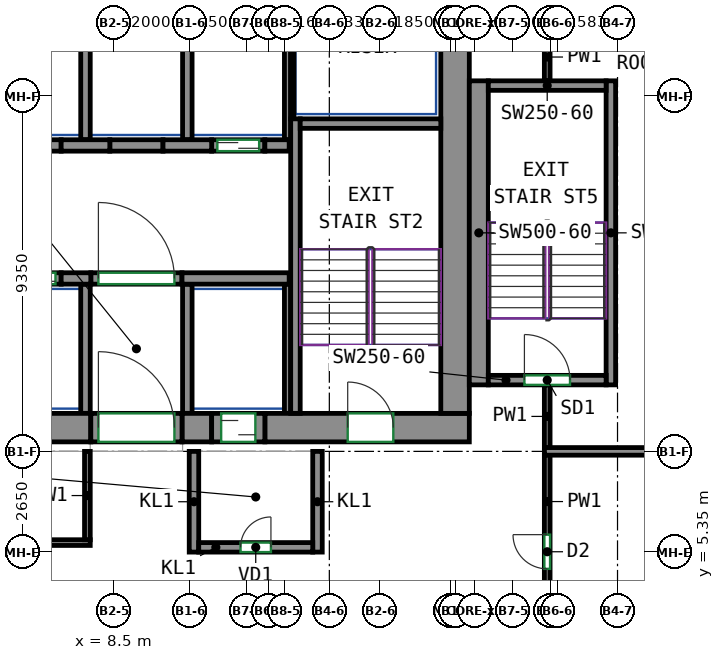
"""IFC4 building model, lengths in metres.
Left out: names, types, materials, properties, quantities, classifications, styles, units other than length and angle.
Written with IfcOpenShell. Run it as: python <this file> out.ifc"""

import sys

from ifc_helpers import new_model, si_unit, direction, frame, frame_2d, origin, place, context, subcontext, project, spatial, rectangle, extrude, source, transform, mapped, element, fill, save


model = new_model("IFC4")
c1 = context("Model", 3, precision=1e-05, world=origin(), true_north=direction((0.0, 1.0)))
c2 = subcontext(c1, "Body", "Model", "MODEL_VIEW")
j1 = project(units=[si_unit("LENGTHUNIT", "METRE"), si_unit("PLANEANGLEUNIT", "RADIAN")], contexts=[c1])
p1 = place(None, origin())
s1 = spatial("IfcSite", under=j1, at=p1, CompositionType="ELEMENT")
p2 = place(p1, origin())
s2 = spatial("IfcBuilding", under=s1, at=p2, CompositionType="ELEMENT")
p3 = place(p2, frame((0.0, 0.0, 188.9)))
s3 = spatial("IfcBuildingStorey", under=s2, at=p3, CompositionType="ELEMENT", Elevation=188.9)
m1 = source(origin(), c2, "Body", "SweptSolid", [
    extrude(rectangle(XDim=14.18, YDim=0.75, at=frame_2d((7.09, 0.0))), origin(), (0.0, 0.0, 1.0), 3.12),
])
p4 = place(p3, frame((-6.29, 8.625, 0.0), z_axis=(0.0, 0.0, 1.0), x_axis=(1.0, 0.0, 0.0)))
e1 = element("IfcWall", 1, at=p4, inside=s3, PredefinedType="SHEAR", context=c2, shape_type="MappedRepresentation", body=[
    mapped(m1, transform((0.0, 0.0, 0.0))),
])
m2 = source(origin(), c2, "Body", "SweptSolid", [
    extrude(rectangle(XDim=0.78, YDim=0.75, at=frame_2d((0.39, 0.0))), origin(), (0.0, 0.0, 1.0), 3.12),
])
p5 = place(p3, frame((10.29, 8.625, 0.0), z_axis=(0.0, 0.0, 1.0), x_axis=(1.0, 0.0, 0.0)))
e2 = element("IfcWall", 2, at=p5, inside=s3, PredefinedType="SHEAR", context=c2, shape_type="MappedRepresentation", body=[
    mapped(m2, transform((0.0, 0.0, 0.0))),
])
m3 = source(origin(), c2, "Body", "SweptSolid", [
    extrude(rectangle(XDim=5.38, YDim=0.75, at=frame_2d((2.69, 0.0))), origin(), (0.0, 0.0, 1.0), 3.12),
])
p6 = place(p3, frame((12.47, 8.625, 0.0), z_axis=(0.0, 0.0, 1.0), x_axis=(1.0, 0.0, 0.0)))
e3 = element("IfcWall", 3, at=p6, inside=s3, PredefinedType="SHEAR", context=c2, shape_type="MappedRepresentation", body=[
    mapped(m3, transform((0.0, 0.0, 0.0))),
])
p7 = place(p6, frame((2.18, 0.0, 0.0)))
e4 = element("IfcOpeningElement", 4, at=p7, cuts=e3, PredefinedType="OPENING", context=c2, shape_type="SweptSolid", body=[
    extrude(rectangle(XDim=1.2, YDim=2.1, at=frame_2d((0.6, 1.05))), frame((0.0, 0.385, 0.0), z_axis=(0.0, -1.0, 0.0), x_axis=(1.0, 0.0, 0.0)), (0.0, 0.0, 1.0), 0.77),
])
m4 = source(origin(), c2, "Body", "SweptSolid", [
    extrude(rectangle(XDim=12.0, YDim=0.75, at=frame_2d((6.0, 0.0))), origin(), (0.0, 0.0, 1.0), 3.12),
])
p8 = place(p3, frame((17.475, 9.0, 0.0), z_axis=(0.0, 0.0, 1.0), x_axis=(0.0, 1.0, 0.0)))
e5 = element("IfcWall", 5, at=p8, inside=s3, PredefinedType="SHEAR", context=c2, shape_type="MappedRepresentation", body=[
    mapped(m4, transform((0.0, 0.0, 0.0))),
])
m5 = source(origin(), c2, "Body", "SweptSolid", [
    extrude(rectangle(XDim=7.75, YDim=0.25, at=frame_2d((3.875, 0.0))), origin(), (0.0, 0.0, 1.0), 3.12),
])
p9 = place(p3, frame((13.275, 9.0, 0.0), z_axis=(0.0, 0.0, 1.0), x_axis=(0.0, 1.0, 0.0)))
e6 = element("IfcWall", 6, at=p9, inside=s3, PredefinedType="SHEAR", context=c2, shape_type="MappedRepresentation", body=[
    mapped(m5, transform((0.0, 0.0, 0.0))),
])
m6 = source(origin(), c2, "Body", "SweptSolid", [
    extrude(rectangle(XDim=3.7, YDim=0.25, at=frame_2d((1.85, 0.0))), origin(), (0.0, 0.0, 1.0), 3.12),
])
p10 = place(p3, frame((13.4, 16.625, 0.0), z_axis=(0.0, 0.0, 1.0), x_axis=(1.0, 0.0, 0.0)))
e7 = element("IfcWall", 7, at=p10, inside=s3, PredefinedType="SHEAR", context=c2, shape_type="MappedRepresentation", body=[
    mapped(m6, transform((0.0, 0.0, 0.0))),
])
m7 = source(origin(), c2, "Body", "SweptSolid", [
    extrude(rectangle(XDim=8.0, YDim=0.5, at=frame_2d((4.0, 0.0))), origin(), (0.0, 0.0, 1.0), 3.12),
])
p11 = place(p3, frame((18.1, 9.75, 0.0), z_axis=(0.0, 0.0, 1.0), x_axis=(0.0, 1.0, 0.0)))
e8 = element("IfcWall", 8, at=p11, inside=s3, PredefinedType="SHEAR", context=c2, shape_type="MappedRepresentation", body=[
    mapped(m7, transform((0.0, 0.0, 0.0))),
])
m8 = source(origin(), c2, "Body", "SweptSolid", [
    extrude(rectangle(XDim=8.0, YDim=0.25, at=frame_2d((4.0, 0.0))), origin(), (0.0, 0.0, 1.0), 3.12),
])
p12 = place(p3, frame((21.575, 9.75, 0.0), z_axis=(0.0, 0.0, 1.0), x_axis=(0.0, 1.0, 0.0)))
e9 = element("IfcWall", 9, at=p12, inside=s3, PredefinedType="SHEAR", context=c2, shape_type="MappedRepresentation", body=[
    mapped(m8, transform((0.0, 0.0, 0.0))),
])
m9 = source(origin(), c2, "Body", "SweptSolid", [
    extrude(rectangle(XDim=3.1, YDim=0.25, at=frame_2d((1.55, 0.0))), origin(), (0.0, 0.0, 1.0), 3.12),
])
p13 = place(p3, frame((18.35, 9.875, 0.0), z_axis=(0.0, 0.0, 1.0), x_axis=(1.0, 0.0, 0.0)))
e10 = element("IfcWall", 10, at=p13, inside=s3, PredefinedType="SHEAR", context=c2, shape_type="MappedRepresentation", body=[
    mapped(m9, transform((0.0, 0.0, 0.0))),
])
p14 = place(p13, frame((0.95, 0.0, 0.0)))
e11 = element("IfcOpeningElement", 11, at=p14, cuts=e10, PredefinedType="OPENING", context=c2, shape_type="SweptSolid", body=[
    extrude(rectangle(XDim=1.2, YDim=2.1, at=frame_2d((0.6, 1.05))), frame((0.0, 0.135, 0.0), z_axis=(0.0, -1.0, 0.0), x_axis=(1.0, 0.0, 0.0)), (0.0, 0.0, 1.0), 0.27),
])
p15 = place(p3, frame((18.35, 17.625, 0.0), z_axis=(0.0, 0.0, 1.0), x_axis=(1.0, 0.0, 0.0)))
e12 = element("IfcWall", 12, at=p15, inside=s3, PredefinedType="SHEAR", context=c2, shape_type="MappedRepresentation", body=[
    mapped(m9, transform((0.0, 0.0, 0.0))),
])
m10 = source(origin(), c2, "Body", "SweptSolid", [
    extrude(rectangle(XDim=0.78, YDim=0.3, at=frame_2d((0.39, 0.0))), origin(), (0.0, 0.0, 1.0), 3.12),
])
p16 = place(p3, frame((7.11, 12.55, 0.0), z_axis=(0.0, 0.0, 1.0), x_axis=(1.0, 0.0, 0.0)))
e13 = element("IfcWall", 13, at=p16, inside=s3, PredefinedType="SHEAR", context=c2, shape_type="MappedRepresentation", body=[
    mapped(m10, transform((0.0, 0.0, 0.0))),
])
m11 = source(origin(), c2, "Body", "SweptSolid", [
    extrude(rectangle(XDim=2.82, YDim=0.3, at=frame_2d((1.41, 0.0))), origin(), (0.0, 0.0, 1.0), 3.12),
])
p17 = place(p3, frame((10.29, 12.55, 0.0), z_axis=(0.0, 0.0, 1.0), x_axis=(1.0, 0.0, 0.0)))
e14 = element("IfcWall", 14, at=p17, inside=s3, PredefinedType="SHEAR", context=c2, shape_type="MappedRepresentation", body=[
    mapped(m11, transform((0.0, 0.0, 0.0))),
])
m12 = source(origin(), c2, "Body", "SweptSolid", [
    extrude(rectangle(XDim=1.28, YDim=0.3, at=frame_2d((0.64, 0.0))), origin(), (0.0, 0.0, 1.0), 3.12),
])
p18 = place(p3, frame((7.11, 16.05, 0.0), z_axis=(0.0, 0.0, 1.0), x_axis=(1.0, 0.0, 0.0)))
e15 = element("IfcWall", 15, at=p18, inside=s3, PredefinedType="SHEAR", context=c2, shape_type="MappedRepresentation", body=[
    mapped(m12, transform((0.0, 0.0, 0.0))),
])
m13 = source(origin(), c2, "Body", "SweptSolid", [
    extrude(rectangle(XDim=1.28, YDim=0.3, at=frame_2d((0.64, 0.0))), origin(), (0.0, 0.0, 1.0), 3.12),
])
p19 = place(p3, frame((9.79, 16.05, 0.0), z_axis=(0.0, 0.0, 1.0), x_axis=(1.0, 0.0, 0.0)))
e16 = element("IfcWall", 16, at=p19, inside=s3, PredefinedType="SHEAR", context=c2, shape_type="MappedRepresentation", body=[
    mapped(m13, transform((0.0, 0.0, 0.0))),
])
m14 = source(origin(), c2, "Body", "SweptSolid", [
    extrude(rectangle(XDim=0.64, YDim=0.3, at=frame_2d((0.32, 0.0))), origin(), (0.0, 0.0, 1.0), 3.12),
])
p20 = place(p3, frame((12.47, 16.05, 0.0), z_axis=(0.0, 0.0, 1.0), x_axis=(1.0, 0.0, 0.0)))
e17 = element("IfcWall", 17, at=p20, inside=s3, PredefinedType="SHEAR", context=c2, shape_type="MappedRepresentation", body=[
    mapped(m14, transform((0.0, 0.0, 0.0))),
])
m15 = source(origin(), c2, "Body", "SweptSolid", [
    extrude(rectangle(XDim=1.4, YDim=0.3, at=frame_2d((0.7, 0.0))), origin(), (0.0, 0.0, 1.0), 3.12),
])
p21 = place(p3, frame((5.71, 12.55, 0.0), z_axis=(0.0, 0.0, 1.0), x_axis=(1.0, 0.0, 0.0)))
e18 = element("IfcWall", 18, at=p21, inside=s3, PredefinedType="PARTITIONING", context=c2, shape_type="MappedRepresentation", body=[
    mapped(m15, transform((0.0, 0.0, 0.0))),
])
p22 = place(p21, frame((0.15, 0.0, 0.0)))
e19 = element("IfcOpeningElement", 19, at=p22, cuts=e18, PredefinedType="OPENING", context=c2, shape_type="SweptSolid", body=[
    extrude(rectangle(XDim=1.1, YDim=2.1, at=frame_2d((0.55, 1.05))), frame((0.0, 0.16, 0.0), z_axis=(0.0, -1.0, 0.0), x_axis=(1.0, 0.0, 0.0)), (0.0, 0.0, 1.0), 0.32),
])
m16 = source(origin(), c2, "Body", "SweptSolid", [
    extrude(rectangle(XDim=1.4, YDim=0.3, at=frame_2d((0.7, 0.0))), origin(), (0.0, 0.0, 1.0), 3.12),
])
p23 = place(p3, frame((11.07, 16.05, 0.0), z_axis=(0.0, 0.0, 1.0), x_axis=(1.0, 0.0, 0.0)))
e20 = element("IfcWall", 20, at=p23, inside=s3, PredefinedType="PARTITIONING", context=c2, shape_type="MappedRepresentation", body=[
    mapped(m16, transform((0.0, 0.0, 0.0))),
])
p24 = place(p23, frame((0.15, 0.0, 0.0)))
e21 = element("IfcOpeningElement", 21, at=p24, cuts=e20, PredefinedType="OPENING", context=c2, shape_type="SweptSolid", body=[
    extrude(rectangle(XDim=1.1, YDim=2.1, at=frame_2d((0.55, 1.05))), frame((0.0, 0.16, 0.0), z_axis=(0.0, -1.0, 0.0), x_axis=(1.0, 0.0, 0.0)), (0.0, 0.0, 1.0), 0.32),
])
m17 = source(origin(), c2, "Body", "SweptSolid", [
    extrude(rectangle(XDim=2.4, YDim=0.3, at=frame_2d((1.2, 0.0))), origin(), (0.0, 0.0, 1.0), 3.12),
])
p25 = place(p3, frame((7.89, 12.55, 0.0), z_axis=(0.0, 0.0, 1.0), x_axis=(1.0, 0.0, 0.0)))
e22 = element("IfcWall", 22, at=p25, inside=s3, PredefinedType="PARTITIONING", context=c2, shape_type="MappedRepresentation", body=[
    mapped(m17, transform((0.0, 0.0, 0.0))),
])
p26 = place(p25, frame((0.2, 0.0, 0.0)))
e23 = element("IfcOpeningElement", 23, at=p26, cuts=e22, PredefinedType="OPENING", context=c2, shape_type="SweptSolid", body=[
    extrude(rectangle(XDim=2.0, YDim=2.1, at=frame_2d((1.0, 1.05))), frame((0.0, 0.16, 0.0), z_axis=(0.0, -1.0, 0.0), x_axis=(1.0, 0.0, 0.0)), (0.0, 0.0, 1.0), 0.32),
])
for number, where, z_axis, x_axis in (
    (24, (5.71, 16.05, 0.0), (0.0, 0.0, 1.0), (1.0, 0.0, 0.0)),
    (25, (8.39, 16.05, 0.0), (0.0, 0.0, 1.0), (1.0, 0.0, 0.0)),
):
    element("IfcWall", number, at=place(p3, frame(where, z_axis=z_axis, x_axis=x_axis)), inside=s3, PredefinedType="PARTITIONING", context=c2, shape_type="MappedRepresentation", body=[
        mapped(m15, transform((0.0, 0.0, 0.0))),
    ])
m18 = source(origin(), c2, "Body", "SweptSolid", [
    extrude(rectangle(XDim=2.65, YDim=0.25, at=frame_2d((1.325, 0.0))), origin(), (0.0, 0.0, 1.0), 3.12),
])
for number, where, z_axis, x_axis in (
    (26, (10.605, 5.35, 0.0), (0.0, 0.0, 1.0), (0.0, 1.0, 0.0)),
    (27, (13.855, 5.35, 0.0), (0.0, 0.0, 1.0), (0.0, 1.0, 0.0)),
):
    element("IfcWall", number, at=place(p3, frame(where, z_axis=z_axis, x_axis=x_axis)), inside=s3, PredefinedType="PARTITIONING", context=c2, shape_type="MappedRepresentation", body=[
        mapped(m18, transform((0.0, 0.0, 0.0))),
    ])
m19 = source(origin(), c2, "Body", "SweptSolid", [
    extrude(rectangle(XDim=3.0, YDim=0.25, at=frame_2d((1.5, 0.0))), origin(), (0.0, 0.0, 1.0), 3.12),
])
p27 = place(p3, frame((10.73, 5.475, 0.0), z_axis=(0.0, 0.0, 1.0), x_axis=(1.0, 0.0, 0.0)))
e28 = element("IfcWall", 28, at=p27, inside=s3, PredefinedType="PARTITIONING", context=c2, shape_type="MappedRepresentation", body=[
    mapped(m19, transform((0.0, 0.0, 0.0))),
])
p28 = place(p27, frame((1.1, 0.0, 0.0)))
e29 = element("IfcOpeningElement", 29, at=p28, cuts=e28, PredefinedType="OPENING", context=c2, shape_type="SweptSolid", body=[
    extrude(rectangle(XDim=0.8, YDim=2.0, at=frame_2d((0.4, 1.0))), frame((0.0, 0.135, 0.0), z_axis=(0.0, -1.0, 0.0), x_axis=(1.0, 0.0, 0.0)), (0.0, 0.0, 1.0), 0.27),
])
m20 = source(origin(), c2, "Body", "SweptSolid", [
    extrude(rectangle(XDim=3.275, YDim=0.165, at=frame_2d((1.638, 0.0))), origin(), (0.0, 0.0, 1.0), 3.12),
])
p29 = place(p3, frame((13.067, 16.2, 0.0), z_axis=(0.0, 0.0, 1.0), x_axis=(0.0, 1.0, 0.0)))
e30 = element("IfcWall", 30, at=p29, inside=s3, PredefinedType="PARTITIONING", context=c2, shape_type="MappedRepresentation", body=[
    mapped(m20, transform((0.0, 0.0, 0.0))),
])
m21 = source(origin(), c2, "Body", "SweptSolid", [
    extrude(rectangle(XDim=3.275, YDim=0.25, at=frame_2d((1.638, 0.0))), origin(), (0.0, 0.0, 1.0), 3.12),
])
p30 = place(p3, frame((10.43, 16.2, 0.0), z_axis=(0.0, 0.0, 1.0), x_axis=(0.0, 1.0, 0.0)))
e31 = element("IfcWall", 31, at=p30, inside=s3, PredefinedType="PARTITIONING", context=c2, shape_type="MappedRepresentation", body=[
    mapped(m21, transform((0.0, 0.0, 0.0))),
])
m22 = source(origin(), c2, "Body", "SweptSolid", [
    extrude(rectangle(XDim=2.725, YDim=0.085, at=frame_2d((1.363, 0.0))), origin(), (0.0, 0.0, 1.0), 3.12),
])
p31 = place(p3, frame((13.192, 16.75, 0.0), z_axis=(0.0, 0.0, 1.0), x_axis=(0.0, 1.0, 0.0)))
e32 = element("IfcWall", 32, at=p31, inside=s3, PredefinedType="PARTITIONING", context=c2, shape_type="MappedRepresentation", body=[
    mapped(m22, transform((0.0, 0.0, 0.0))),
])
p32 = place(p3, frame((7.75, 16.2, 0.0), z_axis=(0.0, 0.0, 1.0), x_axis=(0.0, 1.0, 0.0)))
e33 = element("IfcWall", 33, at=p32, inside=s3, PredefinedType="PARTITIONING", context=c2, shape_type="MappedRepresentation", body=[
    mapped(m21, transform((0.0, 0.0, 0.0))),
])
m23 = source(origin(), c2, "Body", "SweptSolid", [
    extrude(rectangle(XDim=3.4, YDim=0.25, at=frame_2d((1.7, 0.0))), origin(), (0.0, 0.0, 1.0), 3.12),
])
p33 = place(p3, frame((10.43, 9.0, 0.0), z_axis=(0.0, 0.0, 1.0), x_axis=(0.0, 1.0, 0.0)))
e34 = element("IfcWall", 34, at=p33, inside=s3, PredefinedType="PARTITIONING", context=c2, shape_type="MappedRepresentation", body=[
    mapped(m23, transform((0.0, 0.0, 0.0))),
])
m24 = source(origin(), c2, "Body", "SweptSolid", [
    extrude(rectangle(XDim=3.4, YDim=0.165, at=frame_2d((1.7, 0.0))), origin(), (0.0, 0.0, 1.0), 3.12),
])
p34 = place(p3, frame((13.067, 9.0, 0.0), z_axis=(0.0, 0.0, 1.0), x_axis=(0.0, 1.0, 0.0)))
e35 = element("IfcWall", 35, at=p34, inside=s3, PredefinedType="PARTITIONING", context=c2, shape_type="MappedRepresentation", body=[
    mapped(m24, transform((0.0, 0.0, 0.0))),
])
p35 = place(p3, frame((7.75, 9.0, 0.0), z_axis=(0.0, 0.0, 1.0), x_axis=(0.0, 1.0, 0.0)))
e36 = element("IfcWall", 36, at=p35, inside=s3, PredefinedType="PARTITIONING", context=c2, shape_type="MappedRepresentation", body=[
    mapped(m23, transform((0.0, 0.0, 0.0))),
])
m25 = source(origin(), c2, "Body", "SweptSolid", [
    extrude(rectangle(XDim=2.4, YDim=0.75, at=frame_2d((1.2, 0.0))), origin(), (0.0, 0.0, 1.0), 2.7),
])
p36 = place(p3, frame((7.89, 8.625, 0.0), z_axis=(0.0, 0.0, 1.0), x_axis=(1.0, 0.0, 0.0)))
e37 = element("IfcWall", 37, at=p36, inside=s3, PredefinedType="PARTITIONING", context=c2, shape_type="MappedRepresentation", body=[
    mapped(m25, transform((0.0, 0.0, 0.0))),
])
p37 = place(p36, frame((0.2, 0.0, 0.0)))
e38 = element("IfcOpeningElement", 38, at=p37, cuts=e37, PredefinedType="OPENING", context=c2, shape_type="SweptSolid", body=[
    extrude(rectangle(XDim=2.0, YDim=2.1, at=frame_2d((1.0, 1.05))), frame((0.0, 0.385, 0.0), z_axis=(0.0, -1.0, 0.0), x_axis=(1.0, 0.0, 0.0)), (0.0, 0.0, 1.0), 0.77),
])
m26 = source(origin(), c2, "Body", "SweptSolid", [
    extrude(rectangle(XDim=1.4, YDim=0.75, at=frame_2d((0.7, 0.0))), origin(), (0.0, 0.0, 1.0), 2.7),
])
p38 = place(p3, frame((11.07, 8.625, 0.0), z_axis=(0.0, 0.0, 1.0), x_axis=(1.0, 0.0, 0.0)))
e39 = element("IfcWall", 39, at=p38, inside=s3, PredefinedType="PARTITIONING", context=c2, shape_type="MappedRepresentation", body=[
    mapped(m26, transform((0.0, 0.0, 0.0))),
])
p39 = place(p38, frame((0.25, 0.0, 0.0)))
e40 = element("IfcOpeningElement", 40, at=p39, cuts=e39, PredefinedType="OPENING", context=c2, shape_type="SweptSolid", body=[
    extrude(rectangle(XDim=0.9, YDim=2.1, at=frame_2d((0.45, 1.05))), frame((0.0, 0.385, 0.0), z_axis=(0.0, -1.0, 0.0), x_axis=(1.0, 0.0, 0.0)), (0.0, 0.0, 1.0), 0.77),
])
p40 = place(p3, frame((19.9, 3.809, 0.0), z_axis=(0.0, 0.0, 1.0), x_axis=(0.0, 1.0, 0.0)))
e41 = element("IfcWall", 41, at=p40, inside=s3, PredefinedType="PARTITIONING", context=c2, shape_type="SweptSolid", body=[
    extrude(rectangle(XDim=4.101, YDim=0.15, at=frame_2d((2.05, 0.0))), origin(), (0.0, 0.0, 1.0), 3.12),
])
p41 = place(p40, frame((1.1, 0.0, 0.0)))
e42 = element("IfcOpeningElement", 42, at=p41, cuts=e41, PredefinedType="OPENING", context=c2, shape_type="SweptSolid", body=[
    extrude(rectangle(XDim=0.9, YDim=2.1, at=frame_2d((0.45, 1.05))), frame((0.0, 0.085, 0.0), z_axis=(0.0, -1.0, 0.0), x_axis=(1.0, 0.0, 0.0)), (0.0, 0.0, 1.0), 0.17),
])
p42 = place(p3, frame((19.9, 17.75, 0.0), z_axis=(0.0, 0.0, 1.0), x_axis=(0.0, 1.0, 0.0)))
e43 = element("IfcWall", 43, at=p42, inside=s3, PredefinedType="PARTITIONING", context=c2, shape_type="SweptSolid", body=[
    extrude(rectangle(XDim=4.175, YDim=0.15, at=frame_2d((2.087, 0.0))), origin(), (0.0, 0.0, 1.0), 3.12),
])
p43 = place(p42, frame((1.638, 0.0, 0.0)))
e44 = element("IfcOpeningElement", 44, at=p43, cuts=e43, PredefinedType="OPENING", context=c2, shape_type="SweptSolid", body=[
    extrude(rectangle(XDim=0.9, YDim=2.1, at=frame_2d((0.45, 1.05))), frame((0.0, 0.085, 0.0), z_axis=(0.0, -1.0, 0.0), x_axis=(1.0, 0.0, 0.0)), (0.0, 0.0, 1.0), 0.17),
])
p44 = place(p3, frame((19.9, 8.09, 0.0), z_axis=(0.0, 0.0, 1.0), x_axis=(0.0, 1.0, 0.0)))
e45 = element("IfcWall", 45, at=p44, inside=s3, PredefinedType="PARTITIONING", context=c2, shape_type="SweptSolid", body=[
    extrude(rectangle(XDim=1.66, YDim=0.15, at=frame_2d((0.83, 0.0))), origin(), (0.0, 0.0, 1.0), 3.12),
])
p45 = place(p3, frame((7.875, 5.6, 0.0), z_axis=(0.0, 0.0, 1.0), x_axis=(-1.0, 0.0, 0.0)))
e46 = element("IfcWall", 46, at=p45, inside=s3, PredefinedType="PARTITIONING", context=c2, shape_type="SweptSolid", body=[
    extrude(rectangle(XDim=13.275, YDim=0.15, at=frame_2d((6.637, 0.0))), origin(), (0.0, 0.0, 1.0), 3.12),
])
p46 = place(p45, frame((10.162, 0.0, 0.0)))
e47 = element("IfcOpeningElement", 47, at=p46, cuts=e46, PredefinedType="OPENING", context=c2, shape_type="SweptSolid", body=[
    extrude(rectangle(XDim=0.9, YDim=2.1, at=frame_2d((0.45, 1.05))), frame((0.0, 0.085, 0.0), z_axis=(0.0, -1.0, 0.0), x_axis=(1.0, 0.0, 0.0)), (0.0, 0.0, 1.0), 0.17),
])
p47 = place(p3, frame((7.8, 8.0, 0.0), z_axis=(0.0, 0.0, 1.0), x_axis=(0.0, -1.0, 0.0)))
e48 = element("IfcWall", 48, at=p47, inside=s3, PredefinedType="PARTITIONING", context=c2, shape_type="SweptSolid", body=[
    extrude(rectangle(XDim=2.325, YDim=0.15, at=frame_2d((1.163, 0.0))), origin(), (0.0, 0.0, 1.0), 3.12),
])
p48 = place(p3, frame((19.827, 8.0, 0.0), z_axis=(0.0, 0.0, 1.0), x_axis=(1.0, 0.0, 0.0)))
e49 = element("IfcWall", 49, at=p48, inside=s3, PredefinedType="PARTITIONING", context=c2, shape_type="SweptSolid", body=[
    extrude(rectangle(XDim=4.573, YDim=0.2, at=frame_2d((2.287, 0.0))), origin(), (0.0, 0.0, 1.0), 3.12),
])
p49 = place(p26, origin())
e50 = element("IfcDoor", 50, at=p49, inside=s3, OperationType="DOUBLE_DOOR_SINGLE_SWING", PredefinedType="DOOR", context=c2, shape_type="SweptSolid", body=[
    extrude(rectangle(XDim=2.0, YDim=2.1, at=frame_2d((1.0, 1.05))), frame((0.0, 0.025, 0.0), z_axis=(0.0, -1.0, 0.0), x_axis=(1.0, 0.0, 0.0)), (0.0, 0.0, 1.0), 0.05),
])
fill(e23, e50)
p50 = place(p37, origin())
e51 = element("IfcDoor", 51, at=p50, inside=s3, OperationType="DOUBLE_DOOR_SINGLE_SWING", PredefinedType="DOOR", context=c2, shape_type="SweptSolid", body=[
    extrude(rectangle(XDim=2.0, YDim=2.1, at=frame_2d((1.0, 1.05))), frame((0.0, 0.28, 0.0), z_axis=(0.0, -1.0, 0.0), x_axis=(1.0, 0.0, 0.0)), (0.0, 0.0, 1.0), 0.05),
])
fill(e38, e51)
p51 = place(p28, origin())
e52 = element("IfcDoor", 52, at=p51, inside=s3, OperationType="SINGLE_SWING_RIGHT", PredefinedType="DOOR", context=c2, shape_type="SweptSolid", body=[
    extrude(rectangle(XDim=0.8, YDim=2.0, at=frame_2d((0.4, 1.0))), frame((0.0, 0.025, 0.0), z_axis=(0.0, -1.0, 0.0), x_axis=(1.0, 0.0, 0.0)), (0.0, 0.0, 1.0), 0.05),
])
fill(e29, e52)
p52 = place(p39, origin())
e53 = element("IfcDoor", 53, at=p52, inside=s3, OperationType="SLIDING_TO_LEFT", PredefinedType="DOOR", context=c2, shape_type="SweptSolid", body=[
    extrude(rectangle(XDim=0.9, YDim=2.1, at=frame_2d((0.45, 1.05))), frame((0.0, 0.28, 0.0), z_axis=(0.0, -1.0, 0.0), x_axis=(1.0, 0.0, 0.0)), (0.0, 0.0, 1.0), 0.05),
])
fill(e40, e53)
p53 = place(p22, origin())
e54 = element("IfcDoor", 54, at=p53, inside=s3, OperationType="DOUBLE_DOOR_SLIDING", PredefinedType="DOOR", context=c2, shape_type="SweptSolid", body=[
    extrude(rectangle(XDim=1.1, YDim=2.1, at=frame_2d((0.55, 1.05))), frame((0.0, 0.025, 0.0), z_axis=(0.0, -1.0, 0.0), x_axis=(1.0, 0.0, 0.0)), (0.0, 0.0, 1.0), 0.05),
])
fill(e19, e54)
p54 = place(p24, origin())
e55 = element("IfcDoor", 55, at=p54, inside=s3, OperationType="DOUBLE_DOOR_SLIDING", PredefinedType="DOOR", context=c2, shape_type="SweptSolid", body=[
    extrude(rectangle(XDim=1.1, YDim=2.1, at=frame_2d((0.55, 1.05))), frame((0.0, 0.025, 0.0), z_axis=(0.0, -1.0, 0.0), x_axis=(1.0, 0.0, 0.0)), (0.0, 0.0, 1.0), 0.05),
])
fill(e21, e55)
p55 = place(p7, origin())
e56 = element("IfcDoor", 56, at=p55, inside=s3, OperationType="DOUBLE_DOOR_SINGLE_SWING", PredefinedType="DOOR", context=c2, shape_type="SweptSolid", body=[
    extrude(rectangle(XDim=1.2, YDim=2.1, at=frame_2d((0.6, 1.05))), frame((0.0, 0.28, 0.0), z_axis=(0.0, -1.0, 0.0), x_axis=(1.0, 0.0, 0.0)), (0.0, 0.0, 1.0), 0.05),
])
fill(e4, e56)
p56 = place(p14, origin())
e57 = element("IfcDoor", 57, at=p56, inside=s3, OperationType="DOUBLE_DOOR_SINGLE_SWING", PredefinedType="DOOR", context=c2, shape_type="SweptSolid", body=[
    extrude(rectangle(XDim=1.2, YDim=2.1, at=frame_2d((0.6, 1.05))), frame((0.0, 0.025, 0.0), z_axis=(0.0, -1.0, 0.0), x_axis=(1.0, 0.0, 0.0)), (0.0, 0.0, 1.0), 0.05),
])
fill(e11, e57)
p57 = place(p41, origin())
e58 = element("IfcDoor", 58, at=p57, inside=s3, OperationType="SINGLE_SWING_RIGHT", PredefinedType="DOOR", context=c2, shape_type="SweptSolid", body=[
    extrude(rectangle(XDim=0.9, YDim=2.1, at=frame_2d((0.45, 1.05))), frame((0.0, 0.025, 0.0), z_axis=(0.0, -1.0, 0.0), x_axis=(1.0, 0.0, 0.0)), (0.0, 0.0, 1.0), 0.05),
])
fill(e42, e58)
save(model, sys.argv[1])
